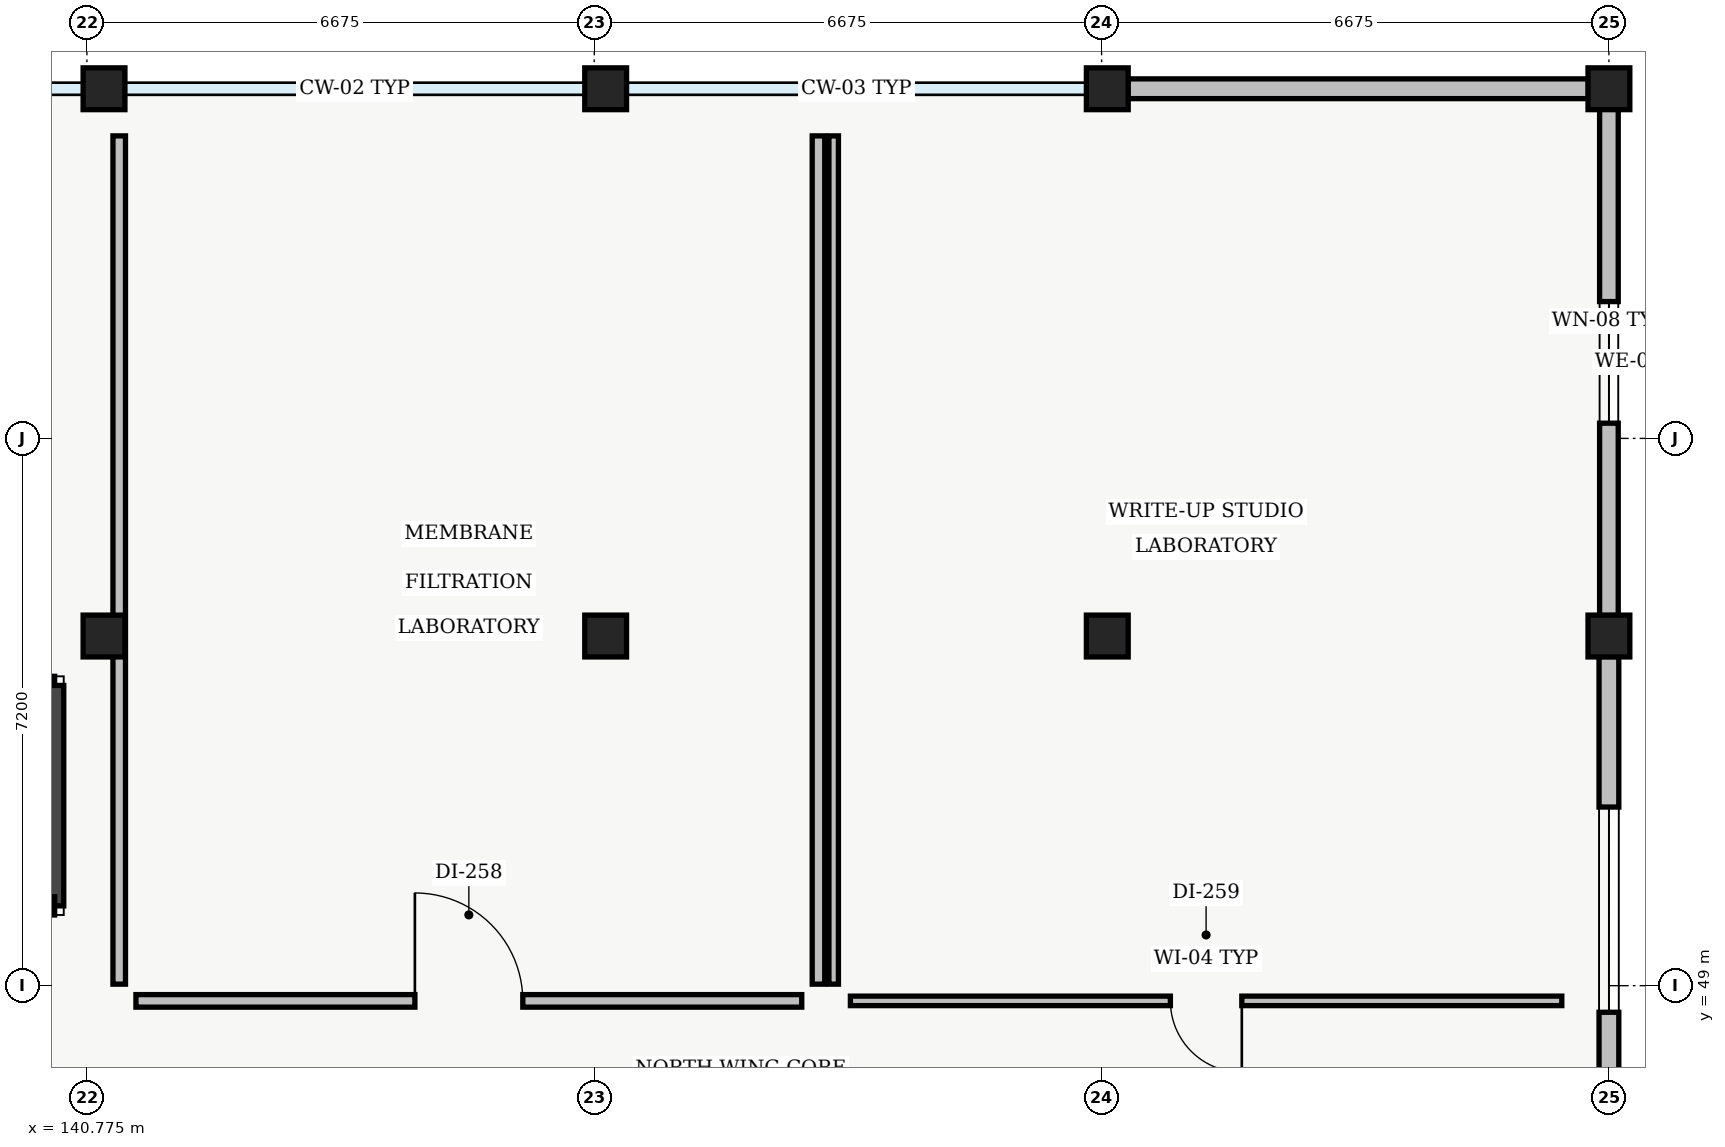
"""IFC4 building model, lengths in metres.
Left out: names, types, materials, properties, quantities, classifications, styles, units other than length and angle.
Written with IfcOpenShell. Run it as: python <this file> out.ifc"""

import sys

from ifc_helpers import new_model, si_unit, direction, frame, frame_2d, origin, origin_2d, place, context, subcontext, project, spatial, rectangle, extrude, element, fill, save


model = new_model("IFC4")
c1 = context("Model", 3, precision=1e-05, world=origin(), true_north=direction((0.0, 1.0)))
c2 = subcontext(c1, "Body", "Model", "MODEL_VIEW")
j1 = project(units=[si_unit("LENGTHUNIT", "METRE"), si_unit("PLANEANGLEUNIT", "RADIAN")], contexts=[c1])
p1 = place(None, origin())
s1 = spatial("IfcSite", under=j1, at=p1, CompositionType="ELEMENT")
p2 = place(p1, origin())
s2 = spatial("IfcBuilding", under=s1, at=p2, CompositionType="ELEMENT")
p3 = place(p2, frame((0.0, 0.0, 32.1)))
s3 = spatial("IfcBuildingStorey", under=s2, at=p3, CompositionType="ELEMENT", Elevation=32.1)
for number, where, z_axis, x_axis in (
    (1, (141.0, 53.6, 0.0), (0.0, 0.0, 1.0), (1.0, 0.0, 0.0)),
    (2, (141.0, 60.8, 0.0), (0.0, 0.0, 1.0), (1.0, 0.0, 0.0)),
    (3, (147.6, 53.6, 0.0), (0.0, 0.0, 1.0), (1.0, 0.0, 0.0)),
    (4, (147.6, 60.8, 0.0), (0.0, 0.0, 1.0), (1.0, 0.0, 0.0)),
    (5, (154.2, 53.6, 0.0), (0.0, 0.0, 1.0), (1.0, 0.0, 0.0)),
    (6, (154.2, 60.8, 0.0), (0.0, 0.0, 1.0), (1.0, 0.0, 0.0)),
    (7, (160.8, 53.6, 0.0), (0.0, 0.0, 1.0), (1.0, 0.0, 0.0)),
    (8, (160.8, 60.8, 0.0), (0.0, 0.0, 1.0), (1.0, 0.0, 0.0)),
):
    element("IfcColumn", number, at=place(p3, frame(where, z_axis=z_axis, x_axis=x_axis)), inside=s3, PredefinedType="COLUMN", context=c2, shape_type="SweptSolid", body=[
        extrude(rectangle(XDim=0.55, YDim=0.55, at=origin_2d()), origin(), (0.0, 0.0, 1.0), 4.305),
    ])
p4 = place(p3, frame((154.47, 60.8, 0.0), z_axis=(0.0, 0.0, 1.0), x_axis=(1.0, 0.0, 0.0)))
e9 = element("IfcWall", 9, at=p4, inside=s3, PredefinedType="STANDARD", context=c2, shape_type="SweptSolid", body=[
    extrude(rectangle(XDim=6.06, YDim=0.26, at=frame_2d((3.03, 0.0))), origin(), (0.0, 0.0, 1.0), 3.79),
])
p5 = place(p3, frame((160.8, 60.53, 0.0), z_axis=(0.0, 0.0, 1.0), x_axis=(0.0, -1.0, 0.0)))
e10 = element("IfcWall", 10, at=p5, inside=s3, PredefinedType="STANDARD", context=c2, shape_type="SweptSolid", body=[
    extrude(rectangle(XDim=6.66, YDim=0.245, at=frame_2d((3.33, 0.0))), origin(), (0.0, 0.0, 1.0), 3.79),
])
p6 = place(p5, frame((2.53, 0.0, 0.95)))
e11 = element("IfcOpeningElement", 11, at=p6, cuts=e10, PredefinedType="OPENING", context=c2, shape_type="SweptSolid", body=[
    extrude(rectangle(XDim=1.6, YDim=1.4, at=frame_2d((0.8, 0.7))), frame((0.0, 0.123, 0.0), z_axis=(0.0, -1.0, 0.0), x_axis=(1.0, 0.0, 0.0)), (0.0, 0.0, 1.0), 0.245),
])
p7 = place(p3, frame((160.8, 53.33, 0.0), z_axis=(0.0, 0.0, 1.0), x_axis=(0.0, -1.0, 0.0)))
e12 = element("IfcWall", 12, at=p7, inside=s3, PredefinedType="STANDARD", context=c2, shape_type="SweptSolid", body=[
    extrude(rectangle(XDim=6.66, YDim=0.26, at=frame_2d((3.33, 0.0))), origin(), (0.0, 0.0, 1.0), 3.79),
])
p8 = place(p7, frame((1.98, 0.0, 0.95)))
e13 = element("IfcOpeningElement", 13, at=p8, cuts=e12, PredefinedType="OPENING", context=c2, shape_type="SweptSolid", body=[
    extrude(rectangle(XDim=2.7, YDim=1.8, at=frame_2d((1.35, 0.9))), frame((0.0, 0.13, 0.0), z_axis=(0.0, -1.0, 0.0), x_axis=(1.0, 0.0, 0.0)), (0.0, 0.0, 1.0), 0.26),
])
p9 = place(p3, frame((138.05, 52.95, 0.0), z_axis=(0.0, 0.0, 1.0), x_axis=(1.0, 0.0, 0.0)))
e14 = element("IfcWall", 14, at=p9, inside=s3, PredefinedType="SHEAR", context=c2, shape_type="SweptSolid", body=[
    extrude(rectangle(XDim=2.3, YDim=0.24, at=frame_2d((1.15, 0.0))), origin(), (0.0, 0.0, 1.0), 4.35),
])
p10 = place(p3, frame((140.35, 52.95, 0.0), z_axis=(0.0, 0.0, 1.0), x_axis=(0.0, -1.0, 0.0)))
e15 = element("IfcWall", 15, at=p10, inside=s3, PredefinedType="SHEAR", context=c2, shape_type="SweptSolid", body=[
    extrude(rectangle(XDim=2.9, YDim=0.24, at=frame_2d((1.45, 0.0))), origin(), (0.0, 0.0, 1.0), 4.35),
])
p11 = place(p3, frame((140.35, 50.05, 0.0), z_axis=(0.0, 0.0, 1.0), x_axis=(-1.0, 0.0, 0.0)))
e16 = element("IfcWall", 16, at=p11, inside=s3, PredefinedType="SHEAR", context=c2, shape_type="SweptSolid", body=[
    extrude(rectangle(XDim=2.3, YDim=0.24, at=frame_2d((1.15, 0.0))), origin(), (0.0, 0.0, 1.0), 4.35),
])
p12 = place(p11, frame((0.425, 0.0, 0.0)))
e17 = element("IfcOpeningElement", 17, at=p12, cuts=e16, PredefinedType="OPENING", context=c2, shape_type="SweptSolid", body=[
    extrude(rectangle(XDim=1.45, YDim=2.3, at=frame_2d((0.725, 1.15))), frame((0.0, 0.12, 0.0), z_axis=(0.0, -1.0, 0.0), x_axis=(1.0, 0.0, 0.0)), (0.0, 0.0, 1.0), 0.24),
])
p13 = place(p3, frame((141.42, 48.8, 0.0), z_axis=(0.0, 0.0, 1.0), x_axis=(1.0, 0.0, 0.0)))
e18 = element("IfcWall", 18, at=p13, inside=s3, PredefinedType="PARTITIONING", context=c2, shape_type="SweptSolid", body=[
    extrude(rectangle(XDim=8.76, YDim=0.165, at=frame_2d((4.38, 0.0))), origin(), (0.0, 0.0, 1.0), 3.89),
])
p14 = place(p13, frame((3.67, 0.0, 0.0)))
e19 = element("IfcOpeningElement", 19, at=p14, cuts=e18, PredefinedType="OPENING", context=c2, shape_type="SweptSolid", body=[
    extrude(rectangle(XDim=1.42, YDim=2.06, at=frame_2d((0.71, 1.03))), frame((0.0, 0.083, 0.0), z_axis=(0.0, -1.0, 0.0), x_axis=(1.0, 0.0, 0.0)), (0.0, 0.0, 1.0), 0.165),
])
p15 = place(p3, frame((150.4, 49.02, 0.0), z_axis=(0.0, 0.0, 1.0), x_axis=(0.0, 1.0, 0.0)))
e20 = element("IfcWall", 20, at=p15, inside=s3, PredefinedType="PARTITIONING", context=c2, shape_type="SweptSolid", body=[
    extrude(rectangle(XDim=11.16, YDim=0.165, at=frame_2d((5.58, 0.0))), origin(), (0.0, 0.0, 1.0), 3.95),
])
p16 = place(p3, frame((141.2, 60.18, 0.0), z_axis=(0.0, 0.0, 1.0), x_axis=(0.0, -1.0, 0.0)))
e21 = element("IfcWall", 21, at=p16, inside=s3, PredefinedType="PARTITIONING", context=c2, shape_type="SweptSolid", body=[
    extrude(rectangle(XDim=11.16, YDim=0.165, at=frame_2d((5.58, 0.0))), origin(), (0.0, 0.0, 1.0), 3.74),
])
p17 = place(p3, frame((150.82, 48.8, 0.0), z_axis=(0.0, 0.0, 1.0), x_axis=(1.0, 0.0, 0.0)))
e22 = element("IfcWall", 22, at=p17, inside=s3, PredefinedType="PARTITIONING", context=c2, shape_type="SweptSolid", body=[
    extrude(rectangle(XDim=9.36, YDim=0.125, at=frame_2d((4.68, 0.0))), origin(), (0.0, 0.0, 1.0), 3.89),
])
p18 = place(p17, frame((4.21, 0.0, 0.0)))
e23 = element("IfcOpeningElement", 23, at=p18, cuts=e22, PredefinedType="OPENING", context=c2, shape_type="SweptSolid", body=[
    extrude(rectangle(XDim=0.94, YDim=2.12, at=frame_2d((0.47, 1.06))), frame((0.0, 0.062, 0.0), z_axis=(0.0, -1.0, 0.0), x_axis=(1.0, 0.0, 0.0)), (0.0, 0.0, 1.0), 0.125),
])
p19 = place(p3, frame((150.6, 60.18, 0.0), z_axis=(0.0, 0.0, 1.0), x_axis=(0.0, -1.0, 0.0)))
e24 = element("IfcWall", 24, at=p19, inside=s3, PredefinedType="PARTITIONING", context=c2, shape_type="SweptSolid", body=[
    extrude(rectangle(XDim=11.16, YDim=0.125, at=frame_2d((5.58, 0.0))), origin(), (0.0, 0.0, 1.0), 3.95),
])
p20 = place(p6, origin())
e25 = element("IfcWindow", 25, at=p20, inside=s3, PartitioningType="SINGLE_PANEL", PredefinedType="WINDOW", context=c2, shape_type="SweptSolid", body=[
    extrude(rectangle(XDim=1.6, YDim=1.4, at=frame_2d((0.8, 0.7))), frame((0.0, 0.03, 0.0), z_axis=(0.0, -1.0, 0.0), x_axis=(1.0, 0.0, 0.0)), (0.0, 0.0, 1.0), 0.06),
])
fill(e11, e25)
p21 = place(p8, origin())
e26 = element("IfcWindow", 26, at=p21, inside=s3, PartitioningType="SINGLE_PANEL", PredefinedType="WINDOW", context=c2, shape_type="SweptSolid", body=[
    extrude(rectangle(XDim=2.7, YDim=1.8, at=frame_2d((1.35, 0.9))), frame((0.0, 0.03, 0.0), z_axis=(0.0, -1.0, 0.0), x_axis=(1.0, 0.0, 0.0)), (0.0, 0.0, 1.0), 0.06),
])
fill(e13, e26)
p22 = place(p14, origin())
e27 = element("IfcDoor", 27, at=p22, inside=s3, OperationType="SINGLE_SWING_LEFT", PredefinedType="DOOR", context=c2, shape_type="SweptSolid", body=[
    extrude(rectangle(XDim=1.42, YDim=2.06, at=frame_2d((0.71, 1.03))), frame((0.0, 0.025, 0.0), z_axis=(0.0, -1.0, 0.0), x_axis=(1.0, 0.0, 0.0)), (0.0, 0.0, 1.0), 0.05),
])
fill(e19, e27)
p23 = place(p18, origin())
e28 = element("IfcDoor", 28, at=p23, inside=s3, OperationType="SINGLE_SWING_RIGHT", PredefinedType="DOOR", context=c2, shape_type="SweptSolid", body=[
    extrude(rectangle(XDim=0.94, YDim=2.12, at=frame_2d((0.47, 1.06))), frame((0.0, 0.025, 0.0), z_axis=(0.0, -1.0, 0.0), x_axis=(1.0, 0.0, 0.0)), (0.0, 0.0, 1.0), 0.05),
])
fill(e23, e28)
save(model, sys.argv[1])
